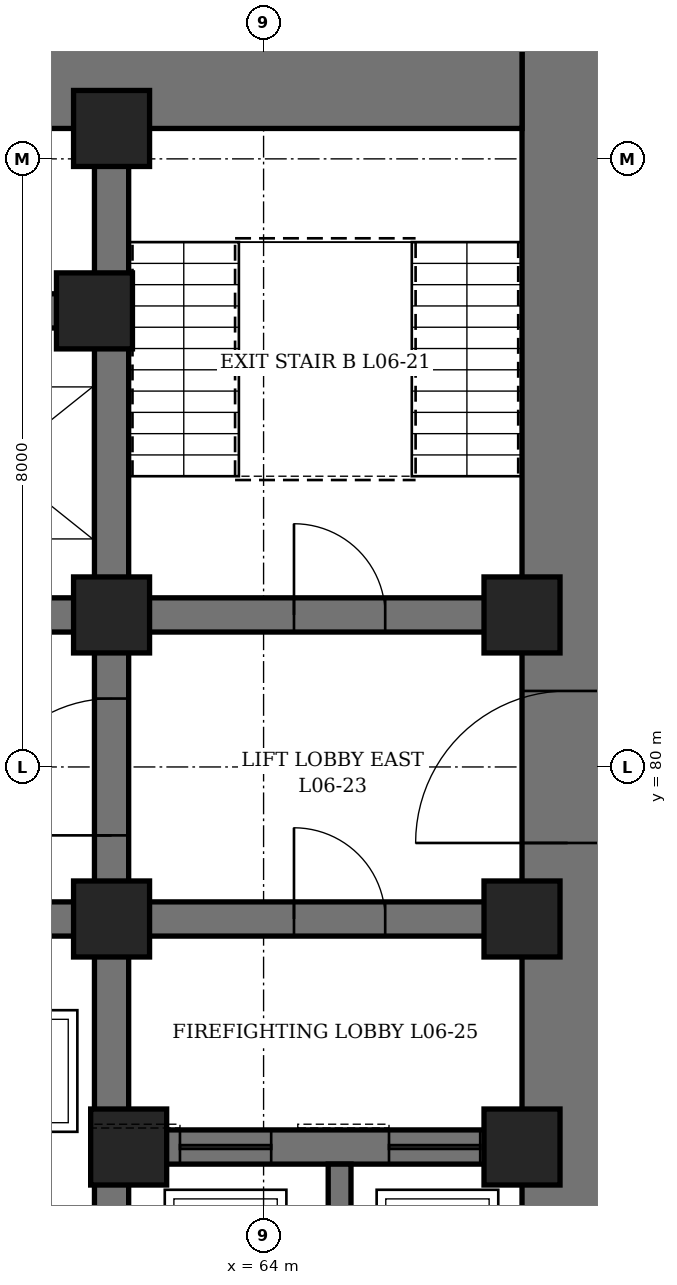
"""IFC4 building model, lengths in metres.
Left out: names, types, materials, properties, quantities, classifications, styles, units other than length and angle.
Written with IfcOpenShell. Run it as: python <this file> out.ifc"""

import sys

from ifc_helpers import new_model, si_unit, direction, frame, frame_2d, origin, origin_2d, place, context, subcontext, project, spatial, rectangle, hollow_rectangle, extrude, element, fill, save


model = new_model("IFC4")
c1 = context("Model", 3, precision=1e-05, world=origin(), true_north=direction((0.0, 1.0)))
c2 = subcontext(c1, "Body", "Model", "MODEL_VIEW")
j1 = project(units=[si_unit("LENGTHUNIT", "METRE"), si_unit("PLANEANGLEUNIT", "RADIAN")], contexts=[c1])
p1 = place(None, origin())
s1 = spatial("IfcSite", under=j1, at=p1, CompositionType="ELEMENT")
p2 = place(p1, origin())
s2 = spatial("IfcBuilding", under=s1, at=p2, CompositionType="ELEMENT")
p3 = place(p2, frame((0.0, 0.0, 34.9)))
s3 = spatial("IfcBuildingStorey", under=s2, at=p3, CompositionType="ELEMENT", Elevation=34.9)
p4 = place(p3, frame((68.0, 70.4, 0.0), z_axis=(0.0, 0.0, 1.0), x_axis=(0.0, 1.0, 0.0)))
e1 = element("IfcWall", 1, at=p4, inside=s3, PredefinedType="SHEAR", context=c2, shape_type="SweptSolid", body=[
    extrude(rectangle(XDim=19.2, YDim=1.2, at=frame_2d((9.6, 0.0))), origin(), (0.0, 0.0, 1.0), 4.2),
])
p5 = place(p4, frame((8.6, 0.0, 0.0)))
e2 = element("IfcOpeningElement", 2, at=p5, cuts=e1, PredefinedType="OPENING", context=c2, shape_type="SweptSolid", body=[
    extrude(rectangle(XDim=2.0, YDim=2.4, at=frame_2d((1.0, 1.2))), frame((0.0, 0.61, 0.0), z_axis=(0.0, -1.0, 0.0), x_axis=(1.0, 0.0, 0.0)), (0.0, 0.0, 1.0), 1.22),
])
p6 = place(p3, frame((44.6, 89.0, 0.0), z_axis=(0.0, 0.0, 1.0), x_axis=(1.0, 0.0, 0.0)))
e3 = element("IfcWall", 3, at=p6, inside=s3, PredefinedType="SHEAR", context=c2, shape_type="SweptSolid", body=[
    extrude(rectangle(XDim=22.8, YDim=1.2, at=frame_2d((11.4, 0.0))), origin(), (0.0, 0.0, 1.0), 4.2),
])
p7 = place(p6, frame((9.475, 0.0, 0.0)))
e4 = element("IfcOpeningElement", 4, at=p7, cuts=e3, PredefinedType="OPENING", context=c2, shape_type="SweptSolid", body=[
    extrude(rectangle(XDim=1.0, YDim=2.1, at=frame_2d((0.5, 1.05))), frame((0.0, 0.61, 0.0), z_axis=(0.0, -1.0, 0.0), x_axis=(1.0, 0.0, 0.0)), (0.0, 0.0, 1.0), 1.22),
])
p8 = place(p6, frame((6.65, 0.0, 0.0)))
e5 = element("IfcOpeningElement", 5, at=p8, cuts=e3, PredefinedType="OPENING", context=c2, shape_type="SweptSolid", body=[
    extrude(rectangle(XDim=0.9, YDim=2.1, at=frame_2d((0.45, 1.05))), frame((0.0, 0.61, 0.0), z_axis=(0.0, -1.0, 0.0), x_axis=(1.0, 0.0, 0.0)), (0.0, 0.0, 1.0), 1.22),
])
p9 = place(p6, frame((13.012, 0.0, 0.0)))
e6 = element("IfcOpeningElement", 6, at=p9, cuts=e3, PredefinedType="OPENING", context=c2, shape_type="SweptSolid", body=[
    extrude(rectangle(XDim=0.9, YDim=2.1, at=frame_2d((0.45, 1.05))), frame((0.0, 0.61, 0.0), z_axis=(0.0, -1.0, 0.0), x_axis=(1.0, 0.0, 0.0)), (0.0, 0.0, 1.0), 1.22),
])
p10 = place(p3, frame((62.0, 71.6, 0.0), z_axis=(0.0, 0.0, 1.0), x_axis=(0.0, 1.0, 0.0)))
e7 = element("IfcWall", 7, at=p10, inside=s3, PredefinedType="SHEAR", context=c2, shape_type="SweptSolid", body=[
    extrude(rectangle(XDim=16.8, YDim=0.45, at=frame_2d((8.4, 0.0))), origin(), (0.0, 0.0, 1.0), 4.2),
])
p11 = place(p10, frame((7.5, 0.0, 0.0)))
e8 = element("IfcOpeningElement", 8, at=p11, cuts=e7, PredefinedType="OPENING", context=c2, shape_type="SweptSolid", body=[
    extrude(rectangle(XDim=1.8, YDim=2.4, at=frame_2d((0.9, 1.2))), frame((0.0, 0.235, 0.0), z_axis=(0.0, -1.0, 0.0), x_axis=(1.0, 0.0, 0.0)), (0.0, 0.0, 1.0), 0.47),
])
p12 = place(p3, frame((62.225, 75.0, 0.0), z_axis=(0.0, 0.0, 1.0), x_axis=(1.0, 0.0, 0.0)))
e9 = element("IfcWall", 9, at=p12, inside=s3, PredefinedType="SHEAR", context=c2, shape_type="SweptSolid", body=[
    extrude(rectangle(XDim=5.175, YDim=0.45, at=frame_2d((2.587, 0.0))), origin(), (0.0, 0.0, 1.0), 4.2),
])
p13 = place(p12, frame((0.675, 0.0, 0.0)))
e10 = element("IfcOpeningElement", 10, at=p13, cuts=e9, PredefinedType="OPENING", context=c2, shape_type="SweptSolid", body=[
    extrude(rectangle(XDim=1.2, YDim=2.2, at=frame_2d((0.6, 1.1))), frame((0.0, 0.235, 0.0), z_axis=(0.0, -1.0, 0.0), x_axis=(1.0, 0.0, 0.0)), (0.0, 0.0, 1.0), 0.47),
])
p14 = place(p12, frame((3.425, 0.0, 0.0)))
e11 = element("IfcOpeningElement", 11, at=p14, cuts=e9, PredefinedType="OPENING", context=c2, shape_type="SweptSolid", body=[
    extrude(rectangle(XDim=1.2, YDim=2.2, at=frame_2d((0.6, 1.1))), frame((0.0, 0.235, 0.0), z_axis=(0.0, -1.0, 0.0), x_axis=(1.0, 0.0, 0.0)), (0.0, 0.0, 1.0), 0.47),
])
p15 = place(p3, frame((62.225, 78.0, 0.0), z_axis=(0.0, 0.0, 1.0), x_axis=(1.0, 0.0, 0.0)))
e12 = element("IfcWall", 12, at=p15, inside=s3, PredefinedType="SHEAR", context=c2, shape_type="SweptSolid", body=[
    extrude(rectangle(XDim=5.175, YDim=0.45, at=frame_2d((2.587, 0.0))), origin(), (0.0, 0.0, 1.0), 4.2),
])
p16 = place(p15, frame((2.175, 0.0, 0.0)))
e13 = element("IfcOpeningElement", 13, at=p16, cuts=e12, PredefinedType="OPENING", context=c2, shape_type="SweptSolid", body=[
    extrude(rectangle(XDim=1.2, YDim=2.1, at=frame_2d((0.6, 1.05))), frame((0.0, 0.235, 0.0), z_axis=(0.0, -1.0, 0.0), x_axis=(1.0, 0.0, 0.0)), (0.0, 0.0, 1.0), 0.47),
])
p17 = place(p3, frame((62.225, 82.0, 0.0), z_axis=(0.0, 0.0, 1.0), x_axis=(1.0, 0.0, 0.0)))
e14 = element("IfcWall", 14, at=p17, inside=s3, PredefinedType="SHEAR", context=c2, shape_type="SweptSolid", body=[
    extrude(rectangle(XDim=5.175, YDim=0.45, at=frame_2d((2.587, 0.0))), origin(), (0.0, 0.0, 1.0), 4.2),
])
p18 = place(p17, frame((2.175, 0.0, 0.0)))
e15 = element("IfcOpeningElement", 15, at=p18, cuts=e14, PredefinedType="OPENING", context=c2, shape_type="SweptSolid", body=[
    extrude(rectangle(XDim=1.2, YDim=2.1, at=frame_2d((0.6, 1.05))), frame((0.0, 0.235, 0.0), z_axis=(0.0, -1.0, 0.0), x_axis=(1.0, 0.0, 0.0)), (0.0, 0.0, 1.0), 0.47),
])
p19 = place(p3, frame((50.225, 78.0, 0.0), z_axis=(0.0, 0.0, 1.0), x_axis=(1.0, 0.0, 0.0)))
e16 = element("IfcWall", 16, at=p19, inside=s3, PredefinedType="SHEAR", context=c2, shape_type="SweptSolid", body=[
    extrude(rectangle(XDim=11.55, YDim=0.45, at=frame_2d((5.775, 0.0))), origin(), (0.0, 0.0, 1.0), 4.2),
])
p20 = place(p19, frame((0.725, 0.0, 0.0)))
e17 = element("IfcOpeningElement", 17, at=p20, cuts=e16, PredefinedType="OPENING", context=c2, shape_type="SweptSolid", body=[
    extrude(rectangle(XDim=1.1, YDim=2.2, at=frame_2d((0.55, 1.1))), frame((0.0, 0.235, 0.0), z_axis=(0.0, -1.0, 0.0), x_axis=(1.0, 0.0, 0.0)), (0.0, 0.0, 1.0), 0.47),
])
p21 = place(p19, frame((3.725, 0.0, 0.0)))
e18 = element("IfcOpeningElement", 18, at=p21, cuts=e16, PredefinedType="OPENING", context=c2, shape_type="SweptSolid", body=[
    extrude(rectangle(XDim=1.1, YDim=2.2, at=frame_2d((0.55, 1.1))), frame((0.0, 0.235, 0.0), z_axis=(0.0, -1.0, 0.0), x_axis=(1.0, 0.0, 0.0)), (0.0, 0.0, 1.0), 0.47),
])
p22 = place(p19, frame((6.725, 0.0, 0.0)))
e19 = element("IfcOpeningElement", 19, at=p22, cuts=e16, PredefinedType="OPENING", context=c2, shape_type="SweptSolid", body=[
    extrude(rectangle(XDim=1.1, YDim=2.2, at=frame_2d((0.55, 1.1))), frame((0.0, 0.235, 0.0), z_axis=(0.0, -1.0, 0.0), x_axis=(1.0, 0.0, 0.0)), (0.0, 0.0, 1.0), 0.47),
])
p23 = place(p19, frame((9.725, 0.0, 0.0)))
e20 = element("IfcOpeningElement", 20, at=p23, cuts=e16, PredefinedType="OPENING", context=c2, shape_type="SweptSolid", body=[
    extrude(rectangle(XDim=1.1, YDim=2.2, at=frame_2d((0.55, 1.1))), frame((0.0, 0.235, 0.0), z_axis=(0.0, -1.0, 0.0), x_axis=(1.0, 0.0, 0.0)), (0.0, 0.0, 1.0), 0.47),
])
for number, where, z_axis, x_axis in (
    (21, (50.225, 82.0, 0.0), (0.0, 0.0, 1.0), (1.0, 0.0, 0.0)),
    (22, (50.225, 86.0, 0.0), (0.0, 0.0, 1.0), (1.0, 0.0, 0.0)),
):
    element("IfcWall", number, at=place(p3, frame(where, z_axis=z_axis, x_axis=x_axis)), inside=s3, PredefinedType="SHEAR", context=c2, shape_type="SweptSolid", body=[
        extrude(rectangle(XDim=11.55, YDim=0.45, at=frame_2d((5.775, 0.0))), origin(), (0.0, 0.0, 1.0), 4.2),
    ])
p24 = place(p3, frame((65.0, 71.6, 0.0), z_axis=(0.0, 0.0, 1.0), x_axis=(0.0, 1.0, 0.0)))
e23 = element("IfcWall", 23, at=p24, inside=s3, PredefinedType="SHEAR", context=c2, shape_type="SweptSolid", body=[
    extrude(rectangle(XDim=3.175, YDim=0.3, at=frame_2d((1.587, 0.0))), origin(), (0.0, 0.0, 1.0), 4.2),
])
for number, where, z_axis, x_axis in (
    (24, (61.775, 86.0, 0.0), (0.0, 0.0, 1.0), (1.0, 0.0, 0.0)),
    (25, (62.0, 78.0, 0.0), (0.0, 0.0, 1.0), (1.0, 0.0, 0.0)),
    (26, (62.0, 82.0, 0.0), (0.0, 0.0, 1.0), (1.0, 0.0, 0.0)),
    (27, (62.0, 88.4, 0.0), (0.0, 0.0, 1.0), (1.0, 0.0, 0.0)),
    (28, (62.225, 75.0, 0.0), (0.0, 0.0, 1.0), (1.0, 0.0, 0.0)),
    (29, (67.4, 75.0, 0.0), (0.0, 0.0, 1.0), (1.0, 0.0, 0.0)),
    (30, (67.4, 78.0, 0.0), (0.0, 0.0, 1.0), (1.0, 0.0, 0.0)),
    (31, (67.4, 82.0, 0.0), (0.0, 0.0, 1.0), (1.0, 0.0, 0.0)),
):
    element("IfcColumn", number, at=place(p3, frame(where, z_axis=z_axis, x_axis=x_axis)), inside=s3, PredefinedType="COLUMN", context=c2, shape_type="SweptSolid", body=[
        extrude(hollow_rectangle(XDim=1.0, YDim=1.0, WallThickness=0.15, at=origin_2d()), origin(), (0.0, 0.0, 1.0), 4.2),
    ])
p25 = place(p18, origin())
e32 = element("IfcDoor", 32, at=p25, inside=s3, OperationType="SINGLE_SWING_LEFT", PredefinedType="DOOR", context=c2, shape_type="SweptSolid", body=[
    extrude(rectangle(XDim=1.2, YDim=2.1, at=frame_2d((0.6, 1.05))), frame((0.0, 0.225, 0.0), z_axis=(0.0, -1.0, 0.0), x_axis=(1.0, 0.0, 0.0)), (0.0, 0.0, 1.0), 0.449),
])
fill(e15, e32)
p26 = place(p5, origin())
e33 = element("IfcDoor", 33, at=p26, inside=s3, OperationType="DOUBLE_DOOR_SINGLE_SWING", PredefinedType="DOOR", context=c2, shape_type="SweptSolid", body=[
    extrude(rectangle(XDim=2.0, YDim=2.4, at=frame_2d((1.0, 1.2))), frame((0.0, 0.35, 0.0), z_axis=(0.0, -1.0, 0.0), x_axis=(1.0, 0.0, 0.0)), (0.0, 0.0, 1.0), 0.7),
])
fill(e2, e33)
p27 = place(p11, origin())
e34 = element("IfcDoor", 34, at=p27, inside=s3, OperationType="DOUBLE_DOOR_SINGLE_SWING", PredefinedType="DOOR", context=c2, shape_type="SweptSolid", body=[
    extrude(rectangle(XDim=1.8, YDim=2.4, at=frame_2d((0.9, 1.2))), frame((0.0, 0.225, 0.0), z_axis=(0.0, -1.0, 0.0), x_axis=(1.0, 0.0, 0.0)), (0.0, 0.0, 1.0), 0.449),
])
fill(e8, e34)
p28 = place(p16, origin())
e35 = element("IfcDoor", 35, at=p28, inside=s3, OperationType="SINGLE_SWING_RIGHT", PredefinedType="DOOR", context=c2, shape_type="SweptSolid", body=[
    extrude(rectangle(XDim=1.2, YDim=2.1, at=frame_2d((0.6, 1.05))), frame((0.0, 0.225, 0.0), z_axis=(0.0, -1.0, 0.0), x_axis=(1.0, 0.0, 0.0)), (0.0, 0.0, 1.0), 0.449),
])
fill(e13, e35)
p29 = place(p13, origin())
e36 = element("IfcDoor", 36, at=p29, inside=s3, OperationType="SLIDING_TO_LEFT", PredefinedType="DOOR", context=c2, shape_type="SweptSolid", body=[
    extrude(rectangle(XDim=1.2, YDim=2.2, at=frame_2d((0.6, 1.1))), frame((0.0, 0.225, 0.0), z_axis=(0.0, -1.0, 0.0), x_axis=(1.0, 0.0, 0.0)), (0.0, 0.0, 1.0), 0.449),
])
fill(e10, e36)
p30 = place(p14, origin())
e37 = element("IfcDoor", 37, at=p30, inside=s3, OperationType="SLIDING_TO_LEFT", PredefinedType="DOOR", context=c2, shape_type="SweptSolid", body=[
    extrude(rectangle(XDim=1.2, YDim=2.2, at=frame_2d((0.6, 1.1))), frame((0.0, 0.225, 0.0), z_axis=(0.0, -1.0, 0.0), x_axis=(1.0, 0.0, 0.0)), (0.0, 0.0, 1.0), 0.449),
])
fill(e11, e37)
save(model, sys.argv[1])
